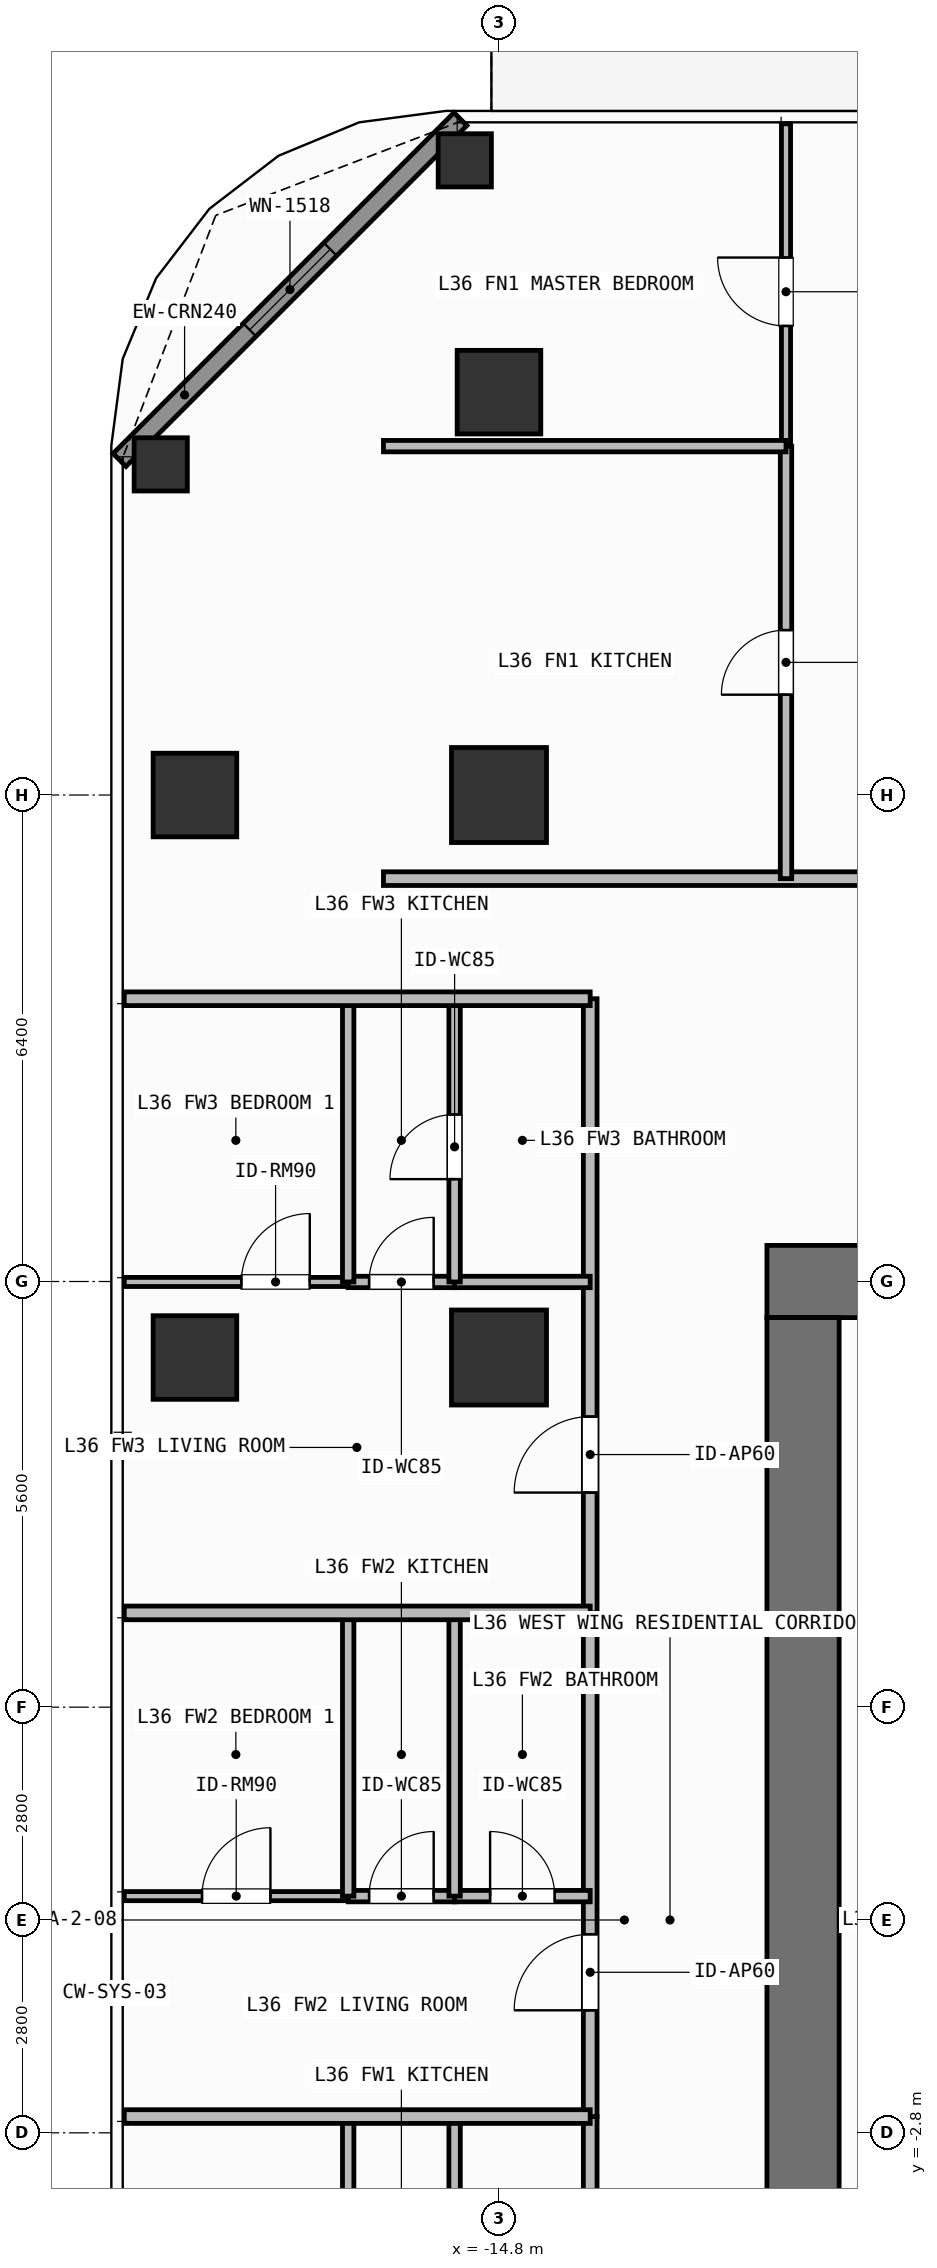
"""IFC4 building model, lengths in metres.
Left out: names, types, materials, properties, quantities, classifications, styles, units other than length and angle.
Written with IfcOpenShell. Run it as: python <this file> out.ifc"""

import sys

from ifc_helpers import new_model, si_unit, direction, frame, frame_2d, origin, origin_2d, place, context, subcontext, project, spatial, rectangle, hollow_rectangle, extrude, element, fill, save


model = new_model("IFC4")
c1 = context("Model", 3, precision=1e-05, world=origin(), true_north=direction((0.0, 1.0)))
c2 = subcontext(c1, "Body", "Model", "MODEL_VIEW")
j1 = project(units=[si_unit("LENGTHUNIT", "METRE"), si_unit("PLANEANGLEUNIT", "RADIAN")], contexts=[c1])
p1 = place(None, origin())
s1 = spatial("IfcSite", under=j1, at=p1, CompositionType="ELEMENT")
p2 = place(p1, origin())
s2 = spatial("IfcBuilding", under=s1, at=p2, CompositionType="ELEMENT")
p3 = place(p2, frame((0.0, 0.0, 144.6)))
s3 = spatial("IfcBuildingStorey", under=s2, at=p3, CompositionType="ELEMENT", Elevation=144.6)
p4 = place(p3, frame((-11.275, 8.4, 0.0), z_axis=(0.0, 0.0, 1.0), x_axis=(1.0, 0.0, 0.0)))
e1 = element("IfcWall", 1, at=p4, inside=s3, PredefinedType="SHEAR", context=c2, shape_type="SweptSolid", body=[
    extrude(rectangle(XDim=1.575, YDim=0.95, at=frame_2d((0.788, 0.0))), origin(), (0.0, 0.0, 1.0), 3.9),
])
p5 = place(p3, frame((-10.8, -7.925, 0.0), z_axis=(0.0, 0.0, 1.0), x_axis=(0.0, 1.0, 0.0)))
e2 = element("IfcWall", 2, at=p5, inside=s3, PredefinedType="SHEAR", context=c2, shape_type="SweptSolid", body=[
    extrude(rectangle(XDim=15.85, YDim=0.95, at=frame_2d((7.925, 0.0))), origin(), (0.0, 0.0, 1.0), 3.9),
])
for number, where, z_axis, x_axis in (
    (3, (-14.8, 14.8, 0.0), (0.0, 0.0, 1.0), (1.0, 0.0, 0.0)),
    (4, (-14.8, 7.4, 0.0), (0.0, 0.0, 1.0), (1.0, 0.0, 0.0)),
):
    element("IfcColumn", number, at=place(p3, frame(where, z_axis=z_axis, x_axis=x_axis)), inside=s3, PredefinedType="COLUMN", context=c2, shape_type="SweptSolid", body=[
        extrude(rectangle(XDim=1.25, YDim=1.25, at=origin_2d()), origin(), (0.0, 0.0, 1.0), 3.9),
    ])
for number, where, z_axis, x_axis in (
    (5, (-18.8, 7.4, 0.0), (0.0, 0.0, 1.0), (1.0, 0.0, 0.0)),
    (6, (-18.8, 14.8, 0.0), (0.0, 0.0, 1.0), (1.0, 0.0, 0.0)),
    (7, (-14.8, 20.1, 0.0), (0.0, 0.0, 1.0), (1.0, 0.0, 0.0)),
):
    element("IfcColumn", number, at=place(p3, frame(where, z_axis=z_axis, x_axis=x_axis)), inside=s3, PredefinedType="COLUMN", context=c2, shape_type="SweptSolid", body=[
        extrude(rectangle(XDim=1.1, YDim=1.1, at=origin_2d()), origin(), (0.0, 0.0, 1.0), 3.9),
    ])
for number, where, z_axis, x_axis in (
    (8, (-15.25, 23.15, 0.0), (0.0, 0.0, 1.0), (1.0, 0.0, 0.0)),
    (9, (-19.25, 19.15, 0.0), (0.0, 0.0, 1.0), (1.0, 0.0, 0.0)),
):
    element("IfcColumn", number, at=place(p3, frame(where, z_axis=z_axis, x_axis=x_axis)), inside=s3, PredefinedType="COLUMN", context=c2, shape_type="SweptSolid", body=[
        extrude(hollow_rectangle(XDim=0.7, YDim=0.7, WallThickness=0.032, at=origin_2d()), origin(), (0.0, 0.0, 1.0), 3.9),
    ])
p6 = place(p3, frame((-19.792, 19.208, 0.0), z_axis=(0.0, 0.0, 1.0), x_axis=(0.707106781187, 0.707106781187, 0.0)))
e10 = element("IfcWall", 10, at=p6, inside=s3, PredefinedType="SOLIDWALL", context=c2, shape_type="SweptSolid", body=[
    extrude(rectangle(XDim=6.343, YDim=0.24, at=frame_2d((3.171, 0.0))), origin(), (0.0, 0.0, 1.0), 3.68),
])
p7 = place(p6, frame((2.421, 0.0, 0.8)))
e11 = element("IfcOpeningElement", 11, at=p7, cuts=e10, PredefinedType="OPENING", context=c2, shape_type="SweptSolid", body=[
    extrude(rectangle(XDim=1.5, YDim=1.85, at=frame_2d((0.75, 0.925))), frame((0.0, 0.13, 0.0), z_axis=(0.0, -1.0, 0.0), x_axis=(1.0, 0.0, 0.0)), (0.0, 0.0, 1.0), 0.26),
])
p8 = place(p3, frame((-16.32, 13.7, 0.0), z_axis=(0.0, 0.0, 1.0), x_axis=(1.0, 0.0, 0.0)))
e12 = element("IfcWall", 12, at=p8, inside=s3, PredefinedType="PARTITIONING", context=c2, shape_type="SweptSolid", body=[
    extrude(rectangle(XDim=17.524, YDim=0.18, at=frame_2d((8.762, 0.0))), origin(), (0.0, 0.0, 1.0), 3.68),
])
p9 = place(p8, frame((7.104, 0.0, 0.0)))
e13 = element("IfcOpeningElement", 13, at=p9, cuts=e12, PredefinedType="OPENING", context=c2, shape_type="SweptSolid", body=[
    extrude(rectangle(XDim=1.0, YDim=2.2, at=frame_2d((0.5, 1.1))), frame((0.0, 0.1, 0.0), z_axis=(0.0, -1.0, 0.0), x_axis=(1.0, 0.0, 0.0)), (0.0, 0.0, 1.0), 0.2),
])
p10 = place(p3, frame((-11.024, 13.7, 0.0), z_axis=(0.0, 0.0, 1.0), x_axis=(0.0, 1.0, 0.0)))
e14 = element("IfcWall", 14, at=p10, inside=s3, PredefinedType="PARTITIONING", context=c2, shape_type="SweptSolid", body=[
    extrude(rectangle(XDim=5.69, YDim=0.15, at=frame_2d((2.845, 0.0))), origin(), (0.0, 0.0, 1.0), 3.68),
])
p11 = place(p10, frame((2.42, 0.0, 0.0)))
e15 = element("IfcOpeningElement", 15, at=p11, cuts=e14, PredefinedType="OPENING", context=c2, shape_type="SweptSolid", body=[
    extrude(rectangle(XDim=0.85, YDim=2.1, at=frame_2d((0.425, 1.05))), frame((0.0, 0.085, 0.0), z_axis=(0.0, -1.0, 0.0), x_axis=(1.0, 0.0, 0.0)), (0.0, 0.0, 1.0), 0.17),
])
p12 = place(p3, frame((-11.024, 19.39, 0.0), z_axis=(0.0, 0.0, 1.0), x_axis=(0.0, 1.0, 0.0)))
e16 = element("IfcWall", 16, at=p12, inside=s3, PredefinedType="PARTITIONING", context=c2, shape_type="SweptSolid", body=[
    extrude(rectangle(XDim=4.24, YDim=0.12, at=frame_2d((2.12, 0.0))), origin(), (0.0, 0.0, 1.0), 3.37),
])
p13 = place(p12, frame((1.581, 0.0, 0.0)))
e17 = element("IfcOpeningElement", 17, at=p13, cuts=e16, PredefinedType="OPENING", context=c2, shape_type="SweptSolid", body=[
    extrude(rectangle(XDim=0.9, YDim=2.1, at=frame_2d((0.45, 1.05))), frame((0.0, 0.07, 0.0), z_axis=(0.0, -1.0, 0.0), x_axis=(1.0, 0.0, 0.0)), (0.0, 0.0, 1.0), 0.14),
])
p14 = place(p3, frame((-13.6, -12.12, 0.0), z_axis=(0.0, 0.0, 1.0), x_axis=(0.0, 1.0, 0.0)))
e18 = element("IfcWall", 18, at=p14, inside=s3, PredefinedType="PARTITIONING", context=c2, shape_type="SweptSolid", body=[
    extrude(rectangle(XDim=9.534, YDim=0.18, at=frame_2d((4.767, 0.0))), origin(), (0.0, 0.0, 1.0), 3.68),
])
p15 = place(p14, frame((1.41, 0.0, 0.0)))
e19 = element("IfcOpeningElement", 19, at=p15, cuts=e18, PredefinedType="OPENING", context=c2, shape_type="SweptSolid", body=[
    extrude(rectangle(XDim=1.0, YDim=2.2, at=frame_2d((0.5, 1.1))), frame((0.0, 0.1, 0.0), z_axis=(0.0, -1.0, 0.0), x_axis=(1.0, 0.0, 0.0)), (0.0, 0.0, 1.0), 0.2),
])
p16 = place(p3, frame((-13.6, -2.586, 0.0), z_axis=(0.0, 0.0, 1.0), x_axis=(0.0, 1.0, 0.0)))
e20 = element("IfcWall", 20, at=p16, inside=s3, PredefinedType="PARTITIONING", context=c2, shape_type="SweptSolid", body=[
    extrude(rectangle(XDim=6.626, YDim=0.18, at=frame_2d((3.313, 0.0))), origin(), (0.0, 0.0, 1.0), 3.68),
])
p17 = place(p16, frame((1.398, 0.0, 0.0)))
e21 = element("IfcOpeningElement", 21, at=p17, cuts=e20, PredefinedType="OPENING", context=c2, shape_type="SweptSolid", body=[
    extrude(rectangle(XDim=1.0, YDim=2.2, at=frame_2d((0.5, 1.1))), frame((0.0, 0.1, 0.0), z_axis=(0.0, -1.0, 0.0), x_axis=(1.0, 0.0, 0.0)), (0.0, 0.0, 1.0), 0.2),
])
p18 = place(p3, frame((-16.784, 0.314, 0.0), z_axis=(0.0, 0.0, 1.0), x_axis=(1.0, 0.0, 0.0)))
e22 = element("IfcWall", 22, at=p18, inside=s3, PredefinedType="PARTITIONING", context=c2, shape_type="SweptSolid", body=[
    extrude(rectangle(XDim=1.4, YDim=0.15, at=frame_2d((0.7, 0.0))), origin(), (0.0, 0.0, 1.0), 3.68),
])
p19 = place(p18, frame((0.275, 0.0, 0.0)))
e23 = element("IfcOpeningElement", 23, at=p19, cuts=e22, PredefinedType="OPENING", context=c2, shape_type="SweptSolid", body=[
    extrude(rectangle(XDim=0.85, YDim=2.1, at=frame_2d((0.425, 1.05))), frame((0.0, 0.085, 0.0), z_axis=(0.0, -1.0, 0.0), x_axis=(1.0, 0.0, 0.0)), (0.0, 0.0, 1.0), 0.17),
])
p20 = place(p3, frame((-15.384, 0.314, 0.0), z_axis=(0.0, 0.0, 1.0), x_axis=(1.0, 0.0, 0.0)))
e24 = element("IfcWall", 24, at=p20, inside=s3, PredefinedType="PARTITIONING", context=c2, shape_type="SweptSolid", body=[
    extrude(rectangle(XDim=1.784, YDim=0.15, at=frame_2d((0.892, 0.0))), origin(), (0.0, 0.0, 1.0), 3.68),
])
p21 = place(p20, frame((0.467, 0.0, 0.0)))
e25 = element("IfcOpeningElement", 25, at=p21, cuts=e24, PredefinedType="OPENING", context=c2, shape_type="SweptSolid", body=[
    extrude(rectangle(XDim=0.85, YDim=2.1, at=frame_2d((0.425, 1.05))), frame((0.0, 0.085, 0.0), z_axis=(0.0, -1.0, 0.0), x_axis=(1.0, 0.0, 0.0)), (0.0, 0.0, 1.0), 0.17),
])
p22 = place(p3, frame((-19.73, 0.314, 0.0), z_axis=(0.0, 0.0, 1.0), x_axis=(1.0, 0.0, 0.0)))
e26 = element("IfcWall", 26, at=p22, inside=s3, PredefinedType="PARTITIONING", context=c2, shape_type="SweptSolid", body=[
    extrude(rectangle(XDim=2.946, YDim=0.12, at=frame_2d((1.473, 0.0))), origin(), (0.0, 0.0, 1.0), 3.68),
])
p23 = place(p22, frame((1.023, 0.0, 0.0)))
e27 = element("IfcOpeningElement", 27, at=p23, cuts=e26, PredefinedType="OPENING", context=c2, shape_type="SweptSolid", body=[
    extrude(rectangle(XDim=0.9, YDim=2.1, at=frame_2d((0.45, 1.05))), frame((0.0, 0.07, 0.0), z_axis=(0.0, -1.0, 0.0), x_axis=(1.0, 0.0, 0.0)), (0.0, 0.0, 1.0), 0.14),
])
p24 = place(p3, frame((-13.6, 4.04, 0.0), z_axis=(0.0, 0.0, 1.0), x_axis=(0.0, 1.0, 0.0)))
e28 = element("IfcWall", 28, at=p24, inside=s3, PredefinedType="PARTITIONING", context=c2, shape_type="SweptSolid", body=[
    extrude(rectangle(XDim=8.08, YDim=0.18, at=frame_2d((4.04, 0.0))), origin(), (0.0, 0.0, 1.0), 3.68),
])
p25 = place(p24, frame((1.583, 0.0, 0.0)))
e29 = element("IfcOpeningElement", 29, at=p25, cuts=e28, PredefinedType="OPENING", context=c2, shape_type="SweptSolid", body=[
    extrude(rectangle(XDim=1.0, YDim=2.2, at=frame_2d((0.5, 1.1))), frame((0.0, 0.1, 0.0), z_axis=(0.0, -1.0, 0.0), x_axis=(1.0, 0.0, 0.0)), (0.0, 0.0, 1.0), 0.2),
])
p26 = place(p3, frame((-16.784, 8.394, 0.0), z_axis=(0.0, 0.0, 1.0), x_axis=(1.0, 0.0, 0.0)))
e30 = element("IfcWall", 30, at=p26, inside=s3, PredefinedType="PARTITIONING", context=c2, shape_type="SweptSolid", body=[
    extrude(rectangle(XDim=1.4, YDim=0.15, at=frame_2d((0.7, 0.0))), origin(), (0.0, 0.0, 1.0), 3.68),
])
p27 = place(p26, frame((0.275, 0.0, 0.0)))
e31 = element("IfcOpeningElement", 31, at=p27, cuts=e30, PredefinedType="OPENING", context=c2, shape_type="SweptSolid", body=[
    extrude(rectangle(XDim=0.85, YDim=2.1, at=frame_2d((0.425, 1.05))), frame((0.0, 0.085, 0.0), z_axis=(0.0, -1.0, 0.0), x_axis=(1.0, 0.0, 0.0)), (0.0, 0.0, 1.0), 0.17),
])
p28 = place(p3, frame((-15.384, 8.394, 0.0), z_axis=(0.0, 0.0, 1.0), x_axis=(1.0, 0.0, 0.0)))
e32 = element("IfcWall", 32, at=p28, inside=s3, PredefinedType="PARTITIONING", context=c2, shape_type="SweptSolid", body=[
    extrude(rectangle(XDim=1.784, YDim=0.15, at=frame_2d((0.892, 0.0))), origin(), (0.0, 0.0, 1.0), 3.68),
])
p29 = place(p3, frame((-19.73, 8.394, 0.0), z_axis=(0.0, 0.0, 1.0), x_axis=(1.0, 0.0, 0.0)))
e33 = element("IfcWall", 33, at=p29, inside=s3, PredefinedType="PARTITIONING", context=c2, shape_type="SweptSolid", body=[
    extrude(rectangle(XDim=2.946, YDim=0.12, at=frame_2d((1.473, 0.0))), origin(), (0.0, 0.0, 1.0), 3.68),
])
p30 = place(p29, frame((1.541, 0.0, 0.0)))
e34 = element("IfcOpeningElement", 34, at=p30, cuts=e33, PredefinedType="OPENING", context=c2, shape_type="SweptSolid", body=[
    extrude(rectangle(XDim=0.9, YDim=2.1, at=frame_2d((0.45, 1.05))), frame((0.0, 0.07, 0.0), z_axis=(0.0, -1.0, 0.0), x_axis=(1.0, 0.0, 0.0)), (0.0, 0.0, 1.0), 0.14),
])
p31 = place(p3, frame((-16.32, 19.39, 0.0), z_axis=(0.0, 0.0, 1.0), x_axis=(1.0, 0.0, 0.0)))
e35 = element("IfcWall", 35, at=p31, inside=s3, PredefinedType="PARTITIONING", context=c2, shape_type="SweptSolid", body=[
    extrude(rectangle(XDim=5.296, YDim=0.15, at=frame_2d((2.648, 0.0))), origin(), (0.0, 0.0, 1.0), 3.68),
])
for number, where, z_axis, x_axis in (
    (36, (-15.384, -9.32, 0.0), (0.0, 0.0, 1.0), (0.0, 1.0, 0.0)),
    (37, (-16.784, -9.32, 0.0), (0.0, 0.0, 1.0), (0.0, 1.0, 0.0)),
):
    element("IfcWall", number, at=place(p3, frame(where, z_axis=z_axis, x_axis=x_axis)), inside=s3, PredefinedType="PARTITIONING", context=c2, shape_type="SweptSolid", body=[
        extrude(rectangle(XDim=6.734, YDim=0.15, at=frame_2d((3.367, 0.0))), origin(), (0.0, 0.0, 1.0), 3.68),
    ])
for number, where, z_axis, x_axis in (
    (38, (-15.384, 0.314, 0.0), (0.0, 0.0, 1.0), (0.0, 1.0, 0.0)),
    (39, (-16.784, 0.314, 0.0), (0.0, 0.0, 1.0), (0.0, 1.0, 0.0)),
):
    element("IfcWall", number, at=place(p3, frame(where, z_axis=z_axis, x_axis=x_axis)), inside=s3, PredefinedType="PARTITIONING", context=c2, shape_type="SweptSolid", body=[
        extrude(rectangle(XDim=3.726, YDim=0.15, at=frame_2d((1.863, 0.0))), origin(), (0.0, 0.0, 1.0), 3.68),
    ])
p32 = place(p3, frame((-19.73, -2.586, 0.0), z_axis=(0.0, 0.0, 1.0), x_axis=(1.0, 0.0, 0.0)))
e40 = element("IfcWall", 40, at=p32, inside=s3, PredefinedType="PARTITIONING", context=c2, shape_type="SweptSolid", body=[
    extrude(rectangle(XDim=6.13, YDim=0.18, at=frame_2d((3.065, 0.0))), origin(), (0.0, 0.0, 1.0), 3.68),
])
p33 = place(p3, frame((-15.384, 8.394, 0.0), z_axis=(0.0, 0.0, 1.0), x_axis=(0.0, 1.0, 0.0)))
e41 = element("IfcWall", 41, at=p33, inside=s3, PredefinedType="PARTITIONING", context=c2, shape_type="SweptSolid", body=[
    extrude(rectangle(XDim=3.726, YDim=0.15, at=frame_2d((1.863, 0.0))), origin(), (0.0, 0.0, 1.0), 3.68),
])
p34 = place(p33, frame((1.353, 0.0, 0.0)))
e42 = element("IfcOpeningElement", 42, at=p34, cuts=e41, PredefinedType="OPENING", context=c2, shape_type="SweptSolid", body=[
    extrude(rectangle(XDim=0.85, YDim=2.1, at=frame_2d((0.425, 1.05))), frame((0.0, 0.085, 0.0), z_axis=(0.0, -1.0, 0.0), x_axis=(1.0, 0.0, 0.0)), (0.0, 0.0, 1.0), 0.17),
])
p35 = place(p3, frame((-16.784, 8.394, 0.0), z_axis=(0.0, 0.0, 1.0), x_axis=(0.0, 1.0, 0.0)))
e43 = element("IfcWall", 43, at=p35, inside=s3, PredefinedType="PARTITIONING", context=c2, shape_type="SweptSolid", body=[
    extrude(rectangle(XDim=3.726, YDim=0.15, at=frame_2d((1.863, 0.0))), origin(), (0.0, 0.0, 1.0), 3.68),
])
for number, where, z_axis, x_axis in (
    (44, (-19.73, 4.04, 0.0), (0.0, 0.0, 1.0), (1.0, 0.0, 0.0)),
    (45, (-19.73, 12.12, 0.0), (0.0, 0.0, 1.0), (1.0, 0.0, 0.0)),
):
    element("IfcWall", number, at=place(p3, frame(where, z_axis=z_axis, x_axis=x_axis)), inside=s3, PredefinedType="PARTITIONING", context=c2, shape_type="SweptSolid", body=[
        extrude(rectangle(XDim=6.13, YDim=0.18, at=frame_2d((3.065, 0.0))), origin(), (0.0, 0.0, 1.0), 3.68),
    ])
p36 = place(p7, origin())
e46 = element("IfcWindow", 46, at=p36, inside=s3, PartitioningType="SINGLE_PANEL", PredefinedType="WINDOW", context=c2, shape_type="SweptSolid", body=[
    extrude(rectangle(XDim=1.5, YDim=1.85, at=frame_2d((0.75, 0.925))), frame((0.0, 0.03, 0.0), z_axis=(0.0, -1.0, 0.0), x_axis=(1.0, 0.0, 0.0)), (0.0, 0.0, 1.0), 0.06),
])
fill(e11, e46)
p37 = place(p11, origin())
e47 = element("IfcDoor", 47, at=p37, inside=s3, OperationType="SINGLE_SWING_LEFT", PredefinedType="DOOR", context=c2, shape_type="SweptSolid", body=[
    extrude(rectangle(XDim=0.85, YDim=2.1, at=frame_2d((0.425, 1.05))), frame((0.0, 0.025, 0.0), z_axis=(0.0, -1.0, 0.0), x_axis=(1.0, 0.0, 0.0)), (0.0, 0.0, 1.0), 0.05),
])
fill(e15, e47)
p38 = place(p13, origin())
e48 = element("IfcDoor", 48, at=p38, inside=s3, OperationType="SINGLE_SWING_RIGHT", PredefinedType="DOOR", context=c2, shape_type="SweptSolid", body=[
    extrude(rectangle(XDim=0.9, YDim=2.1, at=frame_2d((0.45, 1.05))), frame((0.0, 0.025, 0.0), z_axis=(0.0, -1.0, 0.0), x_axis=(1.0, 0.0, 0.0)), (0.0, 0.0, 1.0), 0.05),
])
fill(e17, e48)
p39 = place(p17, origin())
e49 = element("IfcDoor", 49, at=p39, inside=s3, OperationType="SINGLE_SWING_LEFT", PredefinedType="DOOR", context=c2, shape_type="SweptSolid", body=[
    extrude(rectangle(XDim=1.0, YDim=2.2, at=frame_2d((0.5, 1.1))), frame((0.0, 0.025, 0.0), z_axis=(0.0, -1.0, 0.0), x_axis=(1.0, 0.0, 0.0)), (0.0, 0.0, 1.0), 0.05),
])
fill(e21, e49)
p40 = place(p19, origin())
e50 = element("IfcDoor", 50, at=p40, inside=s3, OperationType="SINGLE_SWING_RIGHT", PredefinedType="DOOR", context=c2, shape_type="SweptSolid", body=[
    extrude(rectangle(XDim=0.85, YDim=2.1, at=frame_2d((0.425, 1.05))), frame((0.0, 0.025, 0.0), z_axis=(0.0, -1.0, 0.0), x_axis=(1.0, 0.0, 0.0)), (0.0, 0.0, 1.0), 0.05),
])
fill(e23, e50)
p41 = place(p21, origin())
e51 = element("IfcDoor", 51, at=p41, inside=s3, OperationType="SINGLE_SWING_LEFT", PredefinedType="DOOR", context=c2, shape_type="SweptSolid", body=[
    extrude(rectangle(XDim=0.85, YDim=2.1, at=frame_2d((0.425, 1.05))), frame((0.0, 0.025, 0.0), z_axis=(0.0, -1.0, 0.0), x_axis=(1.0, 0.0, 0.0)), (0.0, 0.0, 1.0), 0.05),
])
fill(e25, e51)
p42 = place(p23, origin())
e52 = element("IfcDoor", 52, at=p42, inside=s3, OperationType="SINGLE_SWING_RIGHT", PredefinedType="DOOR", context=c2, shape_type="SweptSolid", body=[
    extrude(rectangle(XDim=0.9, YDim=2.1, at=frame_2d((0.45, 1.05))), frame((0.0, 0.025, 0.0), z_axis=(0.0, -1.0, 0.0), x_axis=(1.0, 0.0, 0.0)), (0.0, 0.0, 1.0), 0.05),
])
fill(e27, e52)
p43 = place(p25, origin())
e53 = element("IfcDoor", 53, at=p43, inside=s3, OperationType="SINGLE_SWING_LEFT", PredefinedType="DOOR", context=c2, shape_type="SweptSolid", body=[
    extrude(rectangle(XDim=1.0, YDim=2.2, at=frame_2d((0.5, 1.1))), frame((0.0, 0.025, 0.0), z_axis=(0.0, -1.0, 0.0), x_axis=(1.0, 0.0, 0.0)), (0.0, 0.0, 1.0), 0.05),
])
fill(e29, e53)
p44 = place(p27, origin())
e54 = element("IfcDoor", 54, at=p44, inside=s3, OperationType="SINGLE_SWING_RIGHT", PredefinedType="DOOR", context=c2, shape_type="SweptSolid", body=[
    extrude(rectangle(XDim=0.85, YDim=2.1, at=frame_2d((0.425, 1.05))), frame((0.0, 0.025, 0.0), z_axis=(0.0, -1.0, 0.0), x_axis=(1.0, 0.0, 0.0)), (0.0, 0.0, 1.0), 0.05),
])
fill(e31, e54)
p45 = place(p34, origin())
e55 = element("IfcDoor", 55, at=p45, inside=s3, OperationType="SINGLE_SWING_LEFT", PredefinedType="DOOR", context=c2, shape_type="SweptSolid", body=[
    extrude(rectangle(XDim=0.85, YDim=2.1, at=frame_2d((0.425, 1.05))), frame((0.0, 0.025, 0.0), z_axis=(0.0, -1.0, 0.0), x_axis=(1.0, 0.0, 0.0)), (0.0, 0.0, 1.0), 0.05),
])
fill(e42, e55)
p46 = place(p30, origin())
e56 = element("IfcDoor", 56, at=p46, inside=s3, OperationType="SINGLE_SWING_RIGHT", PredefinedType="DOOR", context=c2, shape_type="SweptSolid", body=[
    extrude(rectangle(XDim=0.9, YDim=2.1, at=frame_2d((0.45, 1.05))), frame((0.0, 0.025, 0.0), z_axis=(0.0, -1.0, 0.0), x_axis=(1.0, 0.0, 0.0)), (0.0, 0.0, 1.0), 0.05),
])
fill(e34, e56)
save(model, sys.argv[1])
